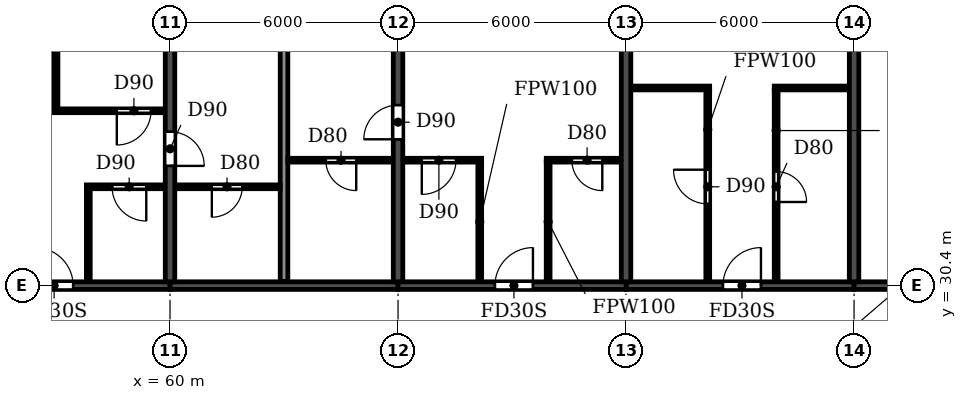
"""IFC4 building model, lengths in metres.
Left out: names, types, materials, properties, quantities, classifications, styles, units other than length and angle.
Written with IfcOpenShell. Run it as: python <this file> out.ifc"""

import sys

from ifc_helpers import new_model, si_unit, direction, frame, frame_2d, origin, place, context, subcontext, project, spatial, rectangle, extrude, element, fill, save


model = new_model("IFC4")
c1 = context("Model", 3, precision=1e-05, world=origin(), true_north=direction((0.0, 1.0)))
c2 = subcontext(c1, "Body", "Model", "MODEL_VIEW")
j1 = project(units=[si_unit("LENGTHUNIT", "METRE"), si_unit("PLANEANGLEUNIT", "RADIAN")], contexts=[c1])
p1 = place(None, origin())
s1 = spatial("IfcSite", under=j1, at=p1, CompositionType="ELEMENT")
p2 = place(p1, origin())
s2 = spatial("IfcBuilding", under=s1, at=p2, CompositionType="ELEMENT")
p3 = place(p2, frame((0.0, 0.0, 191.7)))
s3 = spatial("IfcBuildingStorey", under=s2, at=p3, CompositionType="ELEMENT", Elevation=191.7)
p4 = place(p3, frame((60.0, 30.5, 0.0), z_axis=(0.0, 0.0, 1.0), x_axis=(0.0, 1.0, 0.0)))
e1 = element("IfcWall", 1, at=p4, inside=s3, PredefinedType="SHEAR", context=c2, shape_type="SweptSolid", body=[
    extrude(rectangle(XDim=10.5, YDim=0.25, at=frame_2d((5.25, 0.0))), origin(), (0.0, 0.0, 1.0), 3.08),
])
p5 = place(p4, frame((3.05, 0.0, 0.0)))
e2 = element("IfcOpeningElement", 2, at=p5, cuts=e1, PredefinedType="OPENING", context=c2, shape_type="SweptSolid", body=[
    extrude(rectangle(XDim=0.9, YDim=2.1, at=frame_2d((0.45, 1.05))), frame((0.0, 0.135, 0.0), z_axis=(0.0, -1.0, 0.0), x_axis=(1.0, 0.0, 0.0)), (0.0, 0.0, 1.0), 0.27),
])
p6 = place(p3, frame((66.0, 30.5, 0.0), z_axis=(0.0, 0.0, 1.0), x_axis=(0.0, 1.0, 0.0)))
e3 = element("IfcWall", 3, at=p6, inside=s3, PredefinedType="SHEAR", context=c2, shape_type="SweptSolid", body=[
    extrude(rectangle(XDim=10.5, YDim=0.25, at=frame_2d((5.25, 0.0))), origin(), (0.0, 0.0, 1.0), 3.08),
])
p7 = place(p6, frame((3.75, 0.0, 0.0)))
e4 = element("IfcOpeningElement", 4, at=p7, cuts=e3, PredefinedType="OPENING", context=c2, shape_type="SweptSolid", body=[
    extrude(rectangle(XDim=0.9, YDim=2.1, at=frame_2d((0.45, 1.05))), frame((0.0, 0.135, 0.0), z_axis=(0.0, -1.0, 0.0), x_axis=(1.0, 0.0, 0.0)), (0.0, 0.0, 1.0), 0.27),
])
for number, where, z_axis, x_axis in (
    (5, (72.0, 30.5, 0.0), (0.0, 0.0, 1.0), (0.0, 1.0, 0.0)),
    (6, (78.0, 30.5, 0.0), (0.0, 0.0, 1.0), (0.0, 1.0, 0.0)),
):
    element("IfcWall", number, at=place(p3, frame(where, z_axis=z_axis, x_axis=x_axis)), inside=s3, PredefinedType="SHEAR", context=c2, shape_type="SweptSolid", body=[
        extrude(rectangle(XDim=10.5, YDim=0.25, at=frame_2d((5.25, 0.0))), origin(), (0.0, 0.0, 1.0), 3.08),
    ])
p8 = place(p3, frame((54.0, 30.4, 0.0), z_axis=(0.0, 0.0, 1.0), x_axis=(1.0, 0.0, 0.0)))
e7 = element("IfcWall", 7, at=p8, inside=s3, PredefinedType="SHEAR", context=c2, shape_type="SweptSolid", body=[
    extrude(rectangle(XDim=6.0, YDim=0.2, at=frame_2d((3.0, 0.0))), origin(), (0.0, 0.0, 1.0), 2.48),
])
p9 = place(p8, frame((2.45, 0.0, 0.0)))
e8 = element("IfcOpeningElement", 8, at=p9, cuts=e7, PredefinedType="OPENING", context=c2, shape_type="SweptSolid", body=[
    extrude(rectangle(XDim=1.0, YDim=2.1, at=frame_2d((0.5, 1.05))), frame((0.0, 0.11, 0.0), z_axis=(0.0, -1.0, 0.0), x_axis=(1.0, 0.0, 0.0)), (0.0, 0.0, 1.0), 0.22),
])
p10 = place(p3, frame((60.0, 30.4, 0.0), z_axis=(0.0, 0.0, 1.0), x_axis=(1.0, 0.0, 0.0)))
e9 = element("IfcWall", 9, at=p10, inside=s3, PredefinedType="SHEAR", context=c2, shape_type="SweptSolid", body=[
    extrude(rectangle(XDim=6.0, YDim=0.2, at=frame_2d((3.0, 0.0))), origin(), (0.0, 0.0, 1.0), 2.48),
])
p11 = place(p3, frame((66.0, 30.4, 0.0), z_axis=(0.0, 0.0, 1.0), x_axis=(1.0, 0.0, 0.0)))
e10 = element("IfcWall", 10, at=p11, inside=s3, PredefinedType="SHEAR", context=c2, shape_type="SweptSolid", body=[
    extrude(rectangle(XDim=6.0, YDim=0.2, at=frame_2d((3.0, 0.0))), origin(), (0.0, 0.0, 1.0), 2.48),
])
p12 = place(p11, frame((2.55, 0.0, 0.0)))
e11 = element("IfcOpeningElement", 11, at=p12, cuts=e10, PredefinedType="OPENING", context=c2, shape_type="SweptSolid", body=[
    extrude(rectangle(XDim=1.0, YDim=2.1, at=frame_2d((0.5, 1.05))), frame((0.0, 0.11, 0.0), z_axis=(0.0, -1.0, 0.0), x_axis=(1.0, 0.0, 0.0)), (0.0, 0.0, 1.0), 0.22),
])
p13 = place(p3, frame((72.0, 30.4, 0.0), z_axis=(0.0, 0.0, 1.0), x_axis=(1.0, 0.0, 0.0)))
e12 = element("IfcWall", 12, at=p13, inside=s3, PredefinedType="SHEAR", context=c2, shape_type="SweptSolid", body=[
    extrude(rectangle(XDim=6.0, YDim=0.2, at=frame_2d((3.0, 0.0))), origin(), (0.0, 0.0, 1.0), 2.48),
])
p14 = place(p13, frame((2.55, 0.0, 0.0)))
e13 = element("IfcOpeningElement", 13, at=p14, cuts=e12, PredefinedType="OPENING", context=c2, shape_type="SweptSolid", body=[
    extrude(rectangle(XDim=1.0, YDim=2.1, at=frame_2d((0.5, 1.05))), frame((0.0, 0.11, 0.0), z_axis=(0.0, -1.0, 0.0), x_axis=(1.0, 0.0, 0.0)), (0.0, 0.0, 1.0), 0.22),
])
p15 = place(p3, frame((78.0, 30.4, 0.0), z_axis=(0.0, 0.0, 1.0), x_axis=(1.0, 0.0, 0.0)))
e14 = element("IfcWall", 14, at=p15, inside=s3, PredefinedType="SHEAR", context=c2, shape_type="SweptSolid", body=[
    extrude(rectangle(XDim=5.8, YDim=0.2, at=frame_2d((2.9, 0.0))), origin(), (0.0, 0.0, 1.0), 2.48),
])
p16 = place(p15, frame((2.5, 0.0, 0.0)))
e15 = element("IfcOpeningElement", 15, at=p16, cuts=e14, PredefinedType="OPENING", context=c2, shape_type="SweptSolid", body=[
    extrude(rectangle(XDim=1.0, YDim=2.1, at=frame_2d((0.5, 1.05))), frame((0.0, 0.11, 0.0), z_axis=(0.0, -1.0, 0.0), x_axis=(1.0, 0.0, 0.0)), (0.0, 0.0, 1.0), 0.22),
])
p17 = place(p3, frame((63.0, 30.51, 0.0), z_axis=(0.0, 0.0, 1.0), x_axis=(0.0, 1.0, 0.0)))
e16 = element("IfcWall", 16, at=p17, inside=s3, PredefinedType="PARTITIONING", context=c2, shape_type="SweptSolid", body=[
    extrude(rectangle(XDim=10.63, YDim=0.2, at=frame_2d((5.315, 0.0))), origin(), (0.0, 0.0, 1.0), 3.08),
])
p18 = place(p3, frame((57.8, 33.0, 0.0), z_axis=(0.0, 0.0, 1.0), x_axis=(1.0, 0.0, 0.0)))
e17 = element("IfcWall", 17, at=p18, inside=s3, PredefinedType="PARTITIONING", context=c2, shape_type="SweptSolid", body=[
    extrude(rectangle(XDim=2.065, YDim=0.1, at=frame_2d((1.032, 0.0))), origin(), (0.0, 0.0, 1.0), 3.08),
])
p19 = place(p18, frame((0.675, 0.0, 0.0)))
e18 = element("IfcOpeningElement", 18, at=p19, cuts=e17, PredefinedType="OPENING", context=c2, shape_type="SweptSolid", body=[
    extrude(rectangle(XDim=0.9, YDim=2.1, at=frame_2d((0.45, 1.05))), frame((0.0, 0.06, 0.0), z_axis=(0.0, -1.0, 0.0), x_axis=(1.0, 0.0, 0.0)), (0.0, 0.0, 1.0), 0.12),
])
p20 = place(p3, frame((60.135, 33.0, 0.0), z_axis=(0.0, 0.0, 1.0), x_axis=(1.0, 0.0, 0.0)))
e19 = element("IfcWall", 19, at=p20, inside=s3, PredefinedType="PARTITIONING", context=c2, shape_type="SweptSolid", body=[
    extrude(rectangle(XDim=2.765, YDim=0.1, at=frame_2d((1.382, 0.0))), origin(), (0.0, 0.0, 1.0), 3.08),
])
p21 = place(p20, frame((0.965, 0.0, 0.0)))
e20 = element("IfcOpeningElement", 20, at=p21, cuts=e19, PredefinedType="OPENING", context=c2, shape_type="SweptSolid", body=[
    extrude(rectangle(XDim=0.8, YDim=2.1, at=frame_2d((0.4, 1.05))), frame((0.0, 0.06, 0.0), z_axis=(0.0, -1.0, 0.0), x_axis=(1.0, 0.0, 0.0)), (0.0, 0.0, 1.0), 0.12),
])
p22 = place(p3, frame((63.1, 33.7, 0.0), z_axis=(0.0, 0.0, 1.0), x_axis=(1.0, 0.0, 0.0)))
e21 = element("IfcWall", 21, at=p22, inside=s3, PredefinedType="PARTITIONING", context=c2, shape_type="SweptSolid", body=[
    extrude(rectangle(XDim=2.765, YDim=0.1, at=frame_2d((1.382, 0.0))), origin(), (0.0, 0.0, 1.0), 3.08),
])
p23 = place(p22, frame((1.0, 0.0, 0.0)))
e22 = element("IfcOpeningElement", 22, at=p23, cuts=e21, PredefinedType="OPENING", context=c2, shape_type="SweptSolid", body=[
    extrude(rectangle(XDim=0.8, YDim=2.1, at=frame_2d((0.4, 1.05))), frame((0.0, 0.06, 0.0), z_axis=(0.0, -1.0, 0.0), x_axis=(1.0, 0.0, 0.0)), (0.0, 0.0, 1.0), 0.12),
])
p24 = place(p3, frame((66.135, 33.7, 0.0), z_axis=(0.0, 0.0, 1.0), x_axis=(1.0, 0.0, 0.0)))
e23 = element("IfcWall", 23, at=p24, inside=s3, PredefinedType="PARTITIONING", context=c2, shape_type="SweptSolid", body=[
    extrude(rectangle(XDim=2.065, YDim=0.1, at=frame_2d((1.032, 0.0))), origin(), (0.0, 0.0, 1.0), 3.08),
])
p25 = place(p24, frame((0.49, 0.0, 0.0)))
e24 = element("IfcOpeningElement", 24, at=p25, cuts=e23, PredefinedType="OPENING", context=c2, shape_type="SweptSolid", body=[
    extrude(rectangle(XDim=0.9, YDim=2.1, at=frame_2d((0.45, 1.05))), frame((0.0, 0.06, 0.0), z_axis=(0.0, -1.0, 0.0), x_axis=(1.0, 0.0, 0.0)), (0.0, 0.0, 1.0), 0.12),
])
p26 = place(p3, frame((69.9, 33.7, 0.0), z_axis=(0.0, 0.0, 1.0), x_axis=(1.0, 0.0, 0.0)))
e25 = element("IfcWall", 25, at=p26, inside=s3, PredefinedType="PARTITIONING", context=c2, shape_type="SweptSolid", body=[
    extrude(rectangle(XDim=1.965, YDim=0.1, at=frame_2d((0.982, 0.0))), origin(), (0.0, 0.0, 1.0), 3.08),
])
p27 = place(p26, frame((0.675, 0.0, 0.0)))
e26 = element("IfcOpeningElement", 26, at=p27, cuts=e25, PredefinedType="OPENING", context=c2, shape_type="SweptSolid", body=[
    extrude(rectangle(XDim=0.8, YDim=2.1, at=frame_2d((0.4, 1.05))), frame((0.0, 0.06, 0.0), z_axis=(0.0, -1.0, 0.0), x_axis=(1.0, 0.0, 0.0)), (0.0, 0.0, 1.0), 0.12),
])
p28 = place(p3, frame((56.95, 35.0, 0.0), z_axis=(0.0, 0.0, 1.0), x_axis=(1.0, 0.0, 0.0)))
e27 = element("IfcWall", 27, at=p28, inside=s3, PredefinedType="PARTITIONING", context=c2, shape_type="SweptSolid", body=[
    extrude(rectangle(XDim=2.915, YDim=0.1, at=frame_2d((1.458, 0.0))), origin(), (0.0, 0.0, 1.0), 3.08),
])
p29 = place(p28, frame((1.65, 0.0, 0.0)))
e28 = element("IfcOpeningElement", 28, at=p29, cuts=e27, PredefinedType="OPENING", context=c2, shape_type="SweptSolid", body=[
    extrude(rectangle(XDim=0.9, YDim=2.1, at=frame_2d((0.45, 1.05))), frame((0.0, 0.06, 0.0), z_axis=(0.0, -1.0, 0.0), x_axis=(1.0, 0.0, 0.0)), (0.0, 0.0, 1.0), 0.12),
])
p30 = place(p3, frame((72.135, 35.6, 0.0), z_axis=(0.0, 0.0, 1.0), x_axis=(1.0, 0.0, 0.0)))
e29 = element("IfcWall", 29, at=p30, inside=s3, PredefinedType="PARTITIONING", context=c2, shape_type="SweptSolid", body=[
    extrude(rectangle(XDim=2.065, YDim=0.1, at=frame_2d((1.032, 0.0))), origin(), (0.0, 0.0, 1.0), 3.08),
])
p31 = place(p3, frame((75.9, 35.6, 0.0), z_axis=(0.0, 0.0, 1.0), x_axis=(1.0, 0.0, 0.0)))
e30 = element("IfcWall", 30, at=p31, inside=s3, PredefinedType="PARTITIONING", context=c2, shape_type="SweptSolid", body=[
    extrude(rectangle(XDim=1.965, YDim=0.1, at=frame_2d((0.982, 0.0))), origin(), (0.0, 0.0, 1.0), 3.08),
])
p32 = place(p3, frame((57.0, 35.05, 0.0), z_axis=(0.0, 0.0, 1.0), x_axis=(0.0, 1.0, 0.0)))
e31 = element("IfcWall", 31, at=p32, inside=s3, PredefinedType="PARTITIONING", context=c2, shape_type="SweptSolid", body=[
    extrude(rectangle(XDim=6.09, YDim=0.1, at=frame_2d((3.045, 0.0))), origin(), (0.0, 0.0, 1.0), 3.08),
])
p33 = place(p3, frame((57.85, 30.51, 0.0), z_axis=(0.0, 0.0, 1.0), x_axis=(0.0, 1.0, 0.0)))
e32 = element("IfcWall", 32, at=p33, inside=s3, PredefinedType="PARTITIONING", context=c2, shape_type="SweptSolid", body=[
    extrude(rectangle(XDim=2.44, YDim=0.1, at=frame_2d((1.22, 0.0))), origin(), (0.0, 0.0, 1.0), 3.08),
])
for number, where, z_axis, x_axis in (
    (33, (68.15, 30.51, 0.0), (0.0, 0.0, 1.0), (0.0, 1.0, 0.0)),
    (34, (69.95, 30.51, 0.0), (0.0, 0.0, 1.0), (0.0, 1.0, 0.0)),
):
    element("IfcWall", number, at=place(p3, frame(where, z_axis=z_axis, x_axis=x_axis)), inside=s3, PredefinedType="PARTITIONING", context=c2, shape_type="SweptSolid", body=[
        extrude(rectangle(XDim=3.14, YDim=0.1, at=frame_2d((1.57, 0.0))), origin(), (0.0, 0.0, 1.0), 3.08),
    ])
p34 = place(p3, frame((74.15, 30.51, 0.0), z_axis=(0.0, 0.0, 1.0), x_axis=(0.0, 1.0, 0.0)))
e35 = element("IfcWall", 35, at=p34, inside=s3, PredefinedType="PARTITIONING", context=c2, shape_type="SweptSolid", body=[
    extrude(rectangle(XDim=5.04, YDim=0.1, at=frame_2d((2.52, 0.0))), origin(), (0.0, 0.0, 1.0), 3.08),
])
p35 = place(p34, frame((2.04, 0.0, 0.0)))
e36 = element("IfcOpeningElement", 36, at=p35, cuts=e35, PredefinedType="OPENING", context=c2, shape_type="SweptSolid", body=[
    extrude(rectangle(XDim=0.9, YDim=2.1, at=frame_2d((0.45, 1.05))), frame((0.0, 0.06, 0.0), z_axis=(0.0, -1.0, 0.0), x_axis=(1.0, 0.0, 0.0)), (0.0, 0.0, 1.0), 0.12),
])
p36 = place(p3, frame((75.95, 30.51, 0.0), z_axis=(0.0, 0.0, 1.0), x_axis=(0.0, 1.0, 0.0)))
e37 = element("IfcWall", 37, at=p36, inside=s3, PredefinedType="PARTITIONING", context=c2, shape_type="SweptSolid", body=[
    extrude(rectangle(XDim=5.04, YDim=0.1, at=frame_2d((2.52, 0.0))), origin(), (0.0, 0.0, 1.0), 3.08),
])
p37 = place(p36, frame((2.09, 0.0, 0.0)))
e38 = element("IfcOpeningElement", 38, at=p37, cuts=e37, PredefinedType="OPENING", context=c2, shape_type="SweptSolid", body=[
    extrude(rectangle(XDim=0.8, YDim=2.1, at=frame_2d((0.4, 1.05))), frame((0.0, 0.06, 0.0), z_axis=(0.0, -1.0, 0.0), x_axis=(1.0, 0.0, 0.0)), (0.0, 0.0, 1.0), 0.12),
])
p38 = place(p21, frame((0.8, 0.0, 0.0), z_axis=(0.0, 0.0, 1.0), x_axis=(-1.0, 0.0, 0.0)))
e39 = element("IfcDoor", 39, at=p38, inside=s3, OperationType="SINGLE_SWING_RIGHT", PredefinedType="DOOR", context=c2, shape_type="SweptSolid", body=[
    extrude(rectangle(XDim=0.8, YDim=2.1, at=frame_2d((0.4, 1.05))), frame((0.0, 0.025, 0.0), z_axis=(0.0, -1.0, 0.0), x_axis=(1.0, 0.0, 0.0)), (0.0, 0.0, 1.0), 0.05),
])
fill(e20, e39)
p39 = place(p9, origin())
e40 = element("IfcDoor", 40, at=p39, inside=s3, OperationType="SINGLE_SWING_LEFT", PredefinedType="DOOR", context=c2, shape_type="SweptSolid", body=[
    extrude(rectangle(XDim=1.0, YDim=2.1, at=frame_2d((0.5, 1.05))), frame((0.0, 0.025, 0.0), z_axis=(0.0, -1.0, 0.0), x_axis=(1.0, 0.0, 0.0)), (0.0, 0.0, 1.0), 0.05),
])
fill(e8, e40)
p40 = place(p19, frame((0.9, 0.0, 0.0), z_axis=(0.0, 0.0, 1.0), x_axis=(-1.0, 0.0, 0.0)))
e41 = element("IfcDoor", 41, at=p40, inside=s3, OperationType="SINGLE_SWING_LEFT", PredefinedType="DOOR", context=c2, shape_type="SweptSolid", body=[
    extrude(rectangle(XDim=0.9, YDim=2.1, at=frame_2d((0.45, 1.05))), frame((0.0, 0.025, 0.0), z_axis=(0.0, -1.0, 0.0), x_axis=(1.0, 0.0, 0.0)), (0.0, 0.0, 1.0), 0.05),
])
fill(e18, e41)
p41 = place(p29, frame((0.9, 0.0, 0.0), z_axis=(0.0, 0.0, 1.0), x_axis=(-1.0, 0.0, 0.0)))
e42 = element("IfcDoor", 42, at=p41, inside=s3, OperationType="SINGLE_SWING_RIGHT", PredefinedType="DOOR", context=c2, shape_type="SweptSolid", body=[
    extrude(rectangle(XDim=0.9, YDim=2.1, at=frame_2d((0.45, 1.05))), frame((0.0, 0.025, 0.0), z_axis=(0.0, -1.0, 0.0), x_axis=(1.0, 0.0, 0.0)), (0.0, 0.0, 1.0), 0.05),
])
fill(e28, e42)
p42 = place(p5, frame((0.9, 0.0, 0.0), z_axis=(0.0, 0.0, 1.0), x_axis=(-1.0, 0.0, 0.0)))
e43 = element("IfcDoor", 43, at=p42, inside=s3, OperationType="SINGLE_SWING_RIGHT", PredefinedType="DOOR", context=c2, shape_type="SweptSolid", body=[
    extrude(rectangle(XDim=0.9, YDim=2.1, at=frame_2d((0.45, 1.05))), frame((0.0, 0.025, 0.0), z_axis=(0.0, -1.0, 0.0), x_axis=(1.0, 0.0, 0.0)), (0.0, 0.0, 1.0), 0.05),
])
fill(e2, e43)
p43 = place(p23, frame((0.8, 0.0, 0.0), z_axis=(0.0, 0.0, 1.0), x_axis=(-1.0, 0.0, 0.0)))
e44 = element("IfcDoor", 44, at=p43, inside=s3, OperationType="SINGLE_SWING_LEFT", PredefinedType="DOOR", context=c2, shape_type="SweptSolid", body=[
    extrude(rectangle(XDim=0.8, YDim=2.1, at=frame_2d((0.4, 1.05))), frame((0.0, 0.025, 0.0), z_axis=(0.0, -1.0, 0.0), x_axis=(1.0, 0.0, 0.0)), (0.0, 0.0, 1.0), 0.05),
])
fill(e22, e44)
p44 = place(p7, origin())
e45 = element("IfcDoor", 45, at=p44, inside=s3, OperationType="SINGLE_SWING_LEFT", PredefinedType="DOOR", context=c2, shape_type="SweptSolid", body=[
    extrude(rectangle(XDim=0.9, YDim=2.1, at=frame_2d((0.45, 1.05))), frame((0.0, 0.025, 0.0), z_axis=(0.0, -1.0, 0.0), x_axis=(1.0, 0.0, 0.0)), (0.0, 0.0, 1.0), 0.05),
])
fill(e4, e45)
p45 = place(p25, frame((0.9, 0.0, 0.0), z_axis=(0.0, 0.0, 1.0), x_axis=(-1.0, 0.0, 0.0)))
e46 = element("IfcDoor", 46, at=p45, inside=s3, OperationType="SINGLE_SWING_RIGHT", PredefinedType="DOOR", context=c2, shape_type="SweptSolid", body=[
    extrude(rectangle(XDim=0.9, YDim=2.1, at=frame_2d((0.45, 1.05))), frame((0.0, 0.025, 0.0), z_axis=(0.0, -1.0, 0.0), x_axis=(1.0, 0.0, 0.0)), (0.0, 0.0, 1.0), 0.05),
])
fill(e24, e46)
p46 = place(p12, origin())
e47 = element("IfcDoor", 47, at=p46, inside=s3, OperationType="SINGLE_SWING_RIGHT", PredefinedType="DOOR", context=c2, shape_type="SweptSolid", body=[
    extrude(rectangle(XDim=1.0, YDim=2.1, at=frame_2d((0.5, 1.05))), frame((0.0, 0.025, 0.0), z_axis=(0.0, -1.0, 0.0), x_axis=(1.0, 0.0, 0.0)), (0.0, 0.0, 1.0), 0.05),
])
fill(e11, e47)
p47 = place(p27, frame((0.8, 0.0, 0.0), z_axis=(0.0, 0.0, 1.0), x_axis=(-1.0, 0.0, 0.0)))
e48 = element("IfcDoor", 48, at=p47, inside=s3, OperationType="SINGLE_SWING_LEFT", PredefinedType="DOOR", context=c2, shape_type="SweptSolid", body=[
    extrude(rectangle(XDim=0.8, YDim=2.1, at=frame_2d((0.4, 1.05))), frame((0.0, 0.025, 0.0), z_axis=(0.0, -1.0, 0.0), x_axis=(1.0, 0.0, 0.0)), (0.0, 0.0, 1.0), 0.05),
])
fill(e26, e48)
p48 = place(p35, origin())
e49 = element("IfcDoor", 49, at=p48, inside=s3, OperationType="SINGLE_SWING_RIGHT", PredefinedType="DOOR", context=c2, shape_type="SweptSolid", body=[
    extrude(rectangle(XDim=0.9, YDim=2.1, at=frame_2d((0.45, 1.05))), frame((0.0, 0.025, 0.0), z_axis=(0.0, -1.0, 0.0), x_axis=(1.0, 0.0, 0.0)), (0.0, 0.0, 1.0), 0.05),
])
fill(e36, e49)
p49 = place(p14, origin())
e50 = element("IfcDoor", 50, at=p49, inside=s3, OperationType="SINGLE_SWING_RIGHT", PredefinedType="DOOR", context=c2, shape_type="SweptSolid", body=[
    extrude(rectangle(XDim=1.0, YDim=2.1, at=frame_2d((0.5, 1.05))), frame((0.0, 0.025, 0.0), z_axis=(0.0, -1.0, 0.0), x_axis=(1.0, 0.0, 0.0)), (0.0, 0.0, 1.0), 0.05),
])
fill(e13, e50)
p50 = place(p37, frame((0.8, 0.0, 0.0), z_axis=(0.0, 0.0, 1.0), x_axis=(-1.0, 0.0, 0.0)))
e51 = element("IfcDoor", 51, at=p50, inside=s3, OperationType="SINGLE_SWING_RIGHT", PredefinedType="DOOR", context=c2, shape_type="SweptSolid", body=[
    extrude(rectangle(XDim=0.8, YDim=2.1, at=frame_2d((0.4, 1.05))), frame((0.0, 0.025, 0.0), z_axis=(0.0, -1.0, 0.0), x_axis=(1.0, 0.0, 0.0)), (0.0, 0.0, 1.0), 0.05),
])
fill(e38, e51)
save(model, sys.argv[1])
